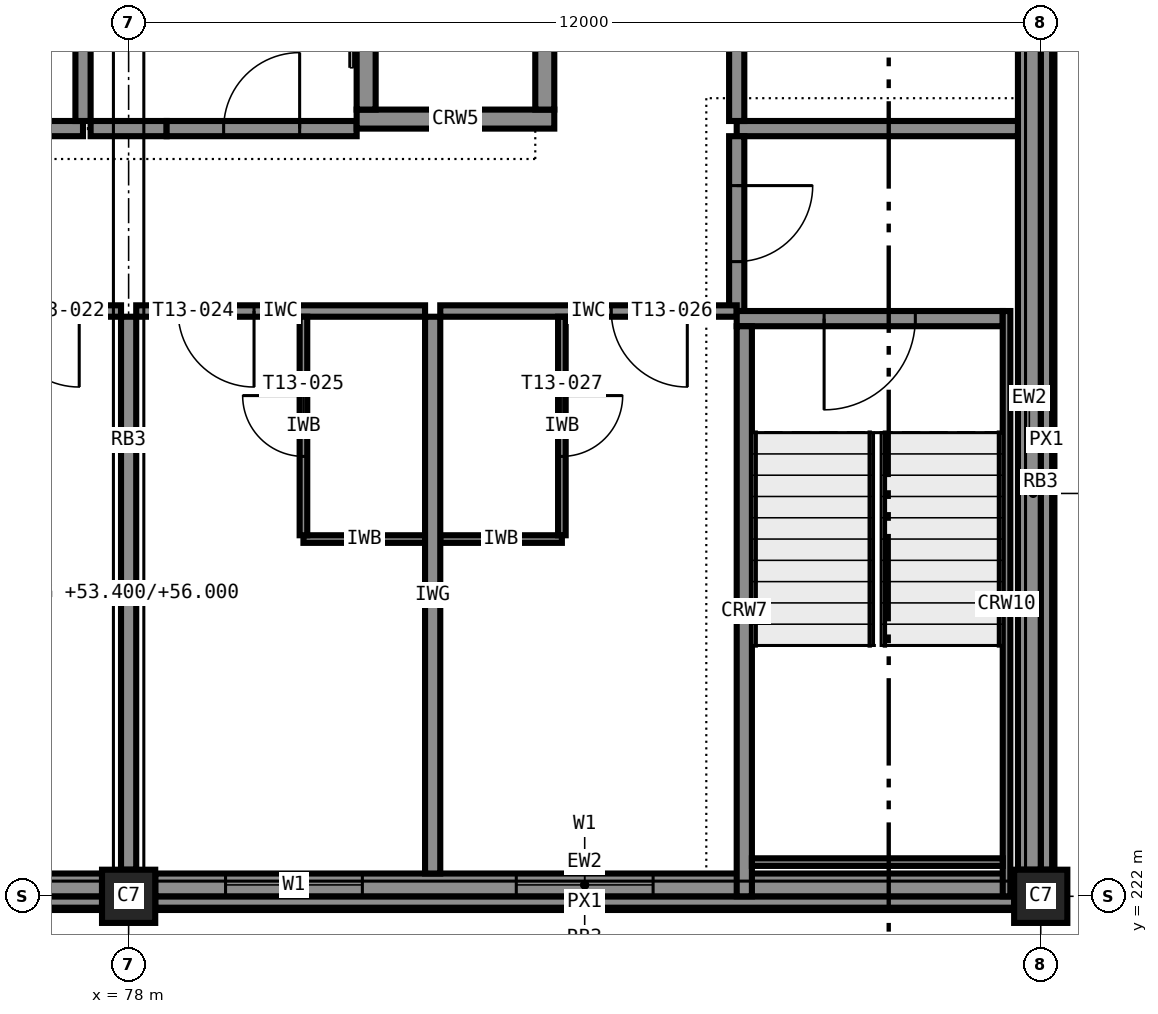
"""IFC4 building model, lengths in metres.
Left out: names, types, materials, properties, quantities, classifications, styles, units other than length and angle.
Written with IfcOpenShell. Run it as: python <this file> out.ifc"""

import sys

from ifc_helpers import new_model, si_unit, direction, frame, frame_2d, origin, origin_2d, place, context, subcontext, project, spatial, rectangle, extrude, element, fill, save


model = new_model("IFC4")
c1 = context("Model", 3, precision=1e-05, world=origin(), true_north=direction((0.0, 1.0)))
c2 = subcontext(c1, "Body", "Model", "MODEL_VIEW")
j1 = project(units=[si_unit("LENGTHUNIT", "METRE"), si_unit("PLANEANGLEUNIT", "RADIAN")], contexts=[c1])
p1 = place(None, origin())
s1 = spatial("IfcSite", under=j1, at=p1, CompositionType="ELEMENT")
p2 = place(p1, origin())
s2 = spatial("IfcBuilding", under=s1, at=p2, CompositionType="ELEMENT")
p3 = place(p2, frame((0.0, 0.0, 53.4)))
s3 = spatial("IfcBuildingStorey", under=s2, at=p3, CompositionType="ELEMENT", Elevation=53.4)
for number, where, z_axis, x_axis in (
    (1, (78.0, 222.0, 0.0), (0.0, 0.0, 1.0), (1.0, 0.0, 0.0)),
    (2, (90.0, 222.0, 0.0), (0.0, 0.0, 1.0), (1.0, 0.0, 0.0)),
):
    element("IfcColumn", number, at=place(p3, frame(where, z_axis=z_axis, x_axis=x_axis)), inside=s3, PredefinedType="COLUMN", context=c2, shape_type="SweptSolid", body=[
        extrude(rectangle(XDim=0.7, YDim=0.7, at=origin_2d()), origin(), (0.0, 0.0, 1.0), 3.6),
    ])
p4 = place(p3, frame((81.0, 232.225, 0.0), z_axis=(0.0, 0.0, 1.0), x_axis=(1.0, 0.0, 0.0)))
e3 = element("IfcWall", 3, at=p4, inside=s3, PredefinedType="SHEAR", context=c2, shape_type="SweptSolid", body=[
    extrude(rectangle(XDim=2.6, YDim=0.25, at=frame_2d((1.3, 0.0))), origin(), (0.0, 0.0, 1.0), 3.6),
])
p5 = place(p3, frame((81.125, 232.35, 0.0), z_axis=(0.0, 0.0, 1.0), x_axis=(0.0, 1.0, 0.0)))
e4 = element("IfcWall", 4, at=p5, inside=s3, PredefinedType="SHEAR", context=c2, shape_type="SweptSolid", body=[
    extrude(rectangle(XDim=3.3, YDim=0.25, at=frame_2d((1.65, 0.0))), origin(), (0.0, 0.0, 1.0), 3.6),
])
p6 = place(p5, frame((1.1, 0.0, 0.0)))
e5 = element("IfcOpeningElement", 5, at=p6, cuts=e4, PredefinedType="OPENING", context=c2, shape_type="SweptSolid", body=[
    extrude(rectangle(XDim=1.1, YDim=2.1, at=frame_2d((0.55, 1.05))), frame((0.0, 0.135, 0.0), z_axis=(0.0, -1.0, 0.0), x_axis=(1.0, 0.0, 0.0)), (0.0, 0.0, 1.0), 0.27),
])
p7 = place(p3, frame((83.475, 232.35, 0.0), z_axis=(0.0, 0.0, 1.0), x_axis=(0.0, 1.0, 0.0)))
e6 = element("IfcWall", 6, at=p7, inside=s3, PredefinedType="SHEAR", context=c2, shape_type="SweptSolid", body=[
    extrude(rectangle(XDim=3.3, YDim=0.25, at=frame_2d((1.65, 0.0))), origin(), (0.0, 0.0, 1.0), 3.6),
])
p8 = place(p3, frame((89.5, 229.6, 0.0), z_axis=(0.0, 0.0, 1.0), x_axis=(-1.0, 0.0, 0.0)))
e7 = element("IfcWall", 7, at=p8, inside=s3, PredefinedType="SHEAR", context=c2, shape_type="SweptSolid", body=[
    extrude(rectangle(XDim=3.5, YDim=0.2, at=frame_2d((1.75, 0.0))), origin(), (0.0, 0.0, 1.0), 3.6),
])
p9 = place(p8, frame((1.15, 0.0, 0.0)))
e8 = element("IfcOpeningElement", 8, at=p9, cuts=e7, PredefinedType="OPENING", context=c2, shape_type="SweptSolid", body=[
    extrude(rectangle(XDim=1.2, YDim=2.1, at=frame_2d((0.6, 1.05))), frame((0.0, 0.11, 0.0), z_axis=(0.0, -1.0, 0.0), x_axis=(1.0, 0.0, 0.0)), (0.0, 0.0, 1.0), 0.22),
])
p10 = place(p3, frame((86.1, 222.0, 0.0), z_axis=(0.0, 0.0, 1.0), x_axis=(0.0, 1.0, 0.0)))
e9 = element("IfcWall", 9, at=p10, inside=s3, PredefinedType="SHEAR", context=c2, shape_type="SweptSolid", body=[
    extrude(rectangle(XDim=7.5, YDim=0.2, at=frame_2d((3.75, 0.0))), origin(), (0.0, 0.0, 1.0), 3.6),
])
p11 = place(p3, frame((89.55, 229.7, 0.0), z_axis=(0.0, 0.0, 1.0), x_axis=(0.0, -1.0, 0.0)))
e10 = element("IfcWall", 10, at=p11, inside=s3, PredefinedType="SHEAR", context=c2, shape_type="SweptSolid", body=[
    extrude(rectangle(XDim=7.7, YDim=0.1, at=frame_2d((3.85, 0.0))), origin(), (0.0, 0.0, 1.0), 3.4),
])
p12 = place(p3, frame((89.5, 222.45, 0.0), z_axis=(0.0, 0.0, 1.0), x_axis=(-1.0, 0.0, 0.0)))
e11 = element("IfcWall", 11, at=p12, inside=s3, PredefinedType="SHEAR", context=c2, shape_type="SweptSolid", body=[
    extrude(rectangle(XDim=3.3, YDim=0.1, at=frame_2d((1.65, 0.0))), origin(), (0.0, 0.0, 1.0), 3.4),
])
p13 = place(p3, frame((66.35, 222.15, 0.0), z_axis=(0.0, 0.0, 1.0), x_axis=(1.0, 0.0, 0.0)))
e12 = element("IfcWall", 12, at=p13, inside=s3, PredefinedType="STANDARD", context=c2, shape_type="SweptSolid", body=[
    extrude(rectangle(XDim=11.3, YDim=0.3, at=frame_2d((5.65, 0.0))), origin(), (0.0, 0.0, 1.0), 2.6),
])
p14 = place(p13, frame((1.125, 0.0, 0.85)))
e13 = element("IfcOpeningElement", 13, at=p14, cuts=e12, PredefinedType="OPENING", context=c2, shape_type="SweptSolid", body=[
    extrude(rectangle(XDim=1.8, YDim=1.75, at=frame_2d((0.9, 0.875))), frame((0.0, 0.16, 0.0), z_axis=(0.0, -1.0, 0.0), x_axis=(1.0, 0.0, 0.0)), (0.0, 0.0, 1.0), 0.32),
])
p15 = place(p13, frame((4.95, 0.0, 0.85)))
e14 = element("IfcOpeningElement", 14, at=p15, cuts=e12, PredefinedType="OPENING", context=c2, shape_type="SweptSolid", body=[
    extrude(rectangle(XDim=1.8, YDim=1.75, at=frame_2d((0.9, 0.875))), frame((0.0, 0.16, 0.0), z_axis=(0.0, -1.0, 0.0), x_axis=(1.0, 0.0, 0.0)), (0.0, 0.0, 1.0), 0.32),
])
p16 = place(p13, frame((8.575, 0.0, 0.85)))
e15 = element("IfcOpeningElement", 15, at=p16, cuts=e12, PredefinedType="OPENING", context=c2, shape_type="SweptSolid", body=[
    extrude(rectangle(XDim=1.8, YDim=1.75, at=frame_2d((0.9, 0.875))), frame((0.0, 0.16, 0.0), z_axis=(0.0, -1.0, 0.0), x_axis=(1.0, 0.0, 0.0)), (0.0, 0.0, 1.0), 0.32),
])
p17 = place(p3, frame((78.35, 222.15, 0.0), z_axis=(0.0, 0.0, 1.0), x_axis=(1.0, 0.0, 0.0)))
e16 = element("IfcWall", 16, at=p17, inside=s3, PredefinedType="STANDARD", context=c2, shape_type="SweptSolid", body=[
    extrude(rectangle(XDim=11.3, YDim=0.3, at=frame_2d((5.65, 0.0))), origin(), (0.0, 0.0, 1.0), 2.6),
])
p18 = place(p17, frame((0.925, 0.0, 0.85)))
e17 = element("IfcOpeningElement", 17, at=p18, cuts=e16, PredefinedType="OPENING", context=c2, shape_type="SweptSolid", body=[
    extrude(rectangle(XDim=1.8, YDim=1.75, at=frame_2d((0.9, 0.875))), frame((0.0, 0.16, 0.0), z_axis=(0.0, -1.0, 0.0), x_axis=(1.0, 0.0, 0.0)), (0.0, 0.0, 1.0), 0.32),
])
p19 = place(p17, frame((4.75, 0.0, 0.85)))
e18 = element("IfcOpeningElement", 18, at=p19, cuts=e16, PredefinedType="OPENING", context=c2, shape_type="SweptSolid", body=[
    extrude(rectangle(XDim=1.8, YDim=1.75, at=frame_2d((0.9, 0.875))), frame((0.0, 0.16, 0.0), z_axis=(0.0, -1.0, 0.0), x_axis=(1.0, 0.0, 0.0)), (0.0, 0.0, 1.0), 0.32),
])
for number, where, z_axis, x_axis in (
    (19, (66.35, 221.925, 3.4), (0.0, 0.0, 1.0), (1.0, 0.0, 0.0)),
    (20, (78.35, 221.925, 3.4), (0.0, 0.0, 1.0), (1.0, 0.0, 0.0)),
):
    element("IfcWall", number, at=place(p3, frame(where, z_axis=z_axis, x_axis=x_axis)), inside=s3, PredefinedType="STANDARD", context=c2, shape_type="SweptSolid", body=[
        extrude(rectangle(XDim=11.3, YDim=0.15, at=frame_2d((5.65, 0.0))), origin(), (0.0, 0.0, 1.0), 0.2),
    ])
p20 = place(p3, frame((89.85, 222.35, 0.0), z_axis=(0.0, 0.0, 1.0), x_axis=(0.0, 1.0, 0.0)))
e21 = element("IfcWall", 21, at=p20, inside=s3, PredefinedType="STANDARD", context=c2, shape_type="SweptSolid", body=[
    extrude(rectangle(XDim=11.3, YDim=0.3, at=frame_2d((5.65, 0.0))), origin(), (0.0, 0.0, 1.0), 2.6),
])
p21 = place(p3, frame((90.075, 222.35, 3.4), z_axis=(0.0, 0.0, 1.0), x_axis=(0.0, 1.0, 0.0)))
e22 = element("IfcWall", 22, at=p21, inside=s3, PredefinedType="STANDARD", context=c2, shape_type="SweptSolid", body=[
    extrude(rectangle(XDim=11.3, YDim=0.15, at=frame_2d((5.65, 0.0))), origin(), (0.0, 0.0, 1.0), 0.2),
])
p22 = place(p3, frame((75.5, 232.1, 0.0), z_axis=(0.0, 0.0, 1.0), x_axis=(1.0, 0.0, 0.0)))
e23 = element("IfcWall", 23, at=p22, inside=s3, PredefinedType="PARTITIONING", context=c2, shape_type="SweptSolid", body=[
    extrude(rectangle(XDim=1.9, YDim=0.2, at=frame_2d((0.95, 0.0))), origin(), (0.0, 0.0, 1.0), 3.4),
])
p23 = place(p3, frame((77.5, 232.1, 0.0), z_axis=(0.0, 0.0, 1.0), x_axis=(1.0, 0.0, 0.0)))
e24 = element("IfcWall", 24, at=p23, inside=s3, PredefinedType="PARTITIONING", context=c2, shape_type="SweptSolid", body=[
    extrude(rectangle(XDim=1.0, YDim=0.2, at=frame_2d((0.5, 0.0))), origin(), (0.0, 0.0, 1.0), 3.4),
])
p24 = place(p3, frame((78.5, 232.1, 0.0), z_axis=(0.0, 0.0, 1.0), x_axis=(1.0, 0.0, 0.0)))
e25 = element("IfcWall", 25, at=p24, inside=s3, PredefinedType="PARTITIONING", context=c2, shape_type="SweptSolid", body=[
    extrude(rectangle(XDim=2.5, YDim=0.2, at=frame_2d((1.25, 0.0))), origin(), (0.0, 0.0, 1.0), 3.4),
])
p25 = place(p24, frame((0.75, 0.0, 0.0)))
e26 = element("IfcOpeningElement", 26, at=p25, cuts=e25, PredefinedType="OPENING", context=c2, shape_type="SweptSolid", body=[
    extrude(rectangle(XDim=1.0, YDim=2.1, at=frame_2d((0.5, 1.05))), frame((0.0, 0.11, 0.0), z_axis=(0.0, -1.0, 0.0), x_axis=(1.0, 0.0, 0.0)), (0.0, 0.0, 1.0), 0.22),
])
p26 = place(p3, frame((86.0, 232.1, 0.0), z_axis=(0.0, 0.0, 1.0), x_axis=(1.0, 0.0, 0.0)))
e27 = element("IfcWall", 27, at=p26, inside=s3, PredefinedType="PARTITIONING", context=c2, shape_type="SweptSolid", body=[
    extrude(rectangle(XDim=3.7, YDim=0.2, at=frame_2d((1.85, 0.0))), origin(), (0.0, 0.0, 1.0), 3.4),
])
p27 = place(p3, frame((77.4, 232.2, 0.0), z_axis=(0.0, 0.0, 1.0), x_axis=(0.0, 1.0, 0.0)))
e28 = element("IfcWall", 28, at=p27, inside=s3, PredefinedType="PARTITIONING", context=c2, shape_type="SweptSolid", body=[
    extrude(rectangle(XDim=3.6, YDim=0.2, at=frame_2d((1.8, 0.0))), origin(), (0.0, 0.0, 1.0), 3.4),
])
p28 = place(p3, frame((86.0, 235.8, 0.0), z_axis=(0.0, 0.0, 1.0), x_axis=(0.0, -1.0, 0.0)))
e29 = element("IfcWall", 29, at=p28, inside=s3, PredefinedType="PARTITIONING", context=c2, shape_type="SweptSolid", body=[
    extrude(rectangle(XDim=3.6, YDim=0.2, at=frame_2d((1.8, 0.0))), origin(), (0.0, 0.0, 1.0), 3.4),
])
p29 = place(p28, frame((1.35, 0.0, 0.0)))
e30 = element("IfcOpeningElement", 30, at=p29, cuts=e29, PredefinedType="OPENING", context=c2, shape_type="SweptSolid", body=[
    extrude(rectangle(XDim=0.9, YDim=2.1, at=frame_2d((0.45, 1.05))), frame((0.0, 0.11, 0.0), z_axis=(0.0, -1.0, 0.0), x_axis=(1.0, 0.0, 0.0)), (0.0, 0.0, 1.0), 0.22),
])
p30 = place(p3, frame((86.0, 232.0, 0.0), z_axis=(0.0, 0.0, 1.0), x_axis=(0.0, -1.0, 0.0)))
e31 = element("IfcWall", 31, at=p30, inside=s3, PredefinedType="PARTITIONING", context=c2, shape_type="SweptSolid", body=[
    extrude(rectangle(XDim=2.3, YDim=0.2, at=frame_2d((1.15, 0.0))), origin(), (0.0, 0.0, 1.0), 3.4),
])
p31 = place(p30, frame((0.65, 0.0, 0.0)))
e32 = element("IfcOpeningElement", 32, at=p31, cuts=e31, PredefinedType="OPENING", context=c2, shape_type="SweptSolid", body=[
    extrude(rectangle(XDim=1.0, YDim=2.1, at=frame_2d((0.5, 1.05))), frame((0.0, 0.11, 0.0), z_axis=(0.0, -1.0, 0.0), x_axis=(1.0, 0.0, 0.0)), (0.0, 0.0, 1.0), 0.22),
])
p32 = place(p3, frame((77.9, 229.7, 0.0), z_axis=(0.0, 0.0, 1.0), x_axis=(-1.0, 0.0, 0.0)))
e33 = element("IfcWall", 33, at=p32, inside=s3, PredefinedType="PARTITIONING", context=c2, shape_type="SweptSolid", body=[
    extrude(rectangle(XDim=3.8, YDim=0.15, at=frame_2d((1.9, 0.0))), origin(), (0.0, 0.0, 1.0), 3.4),
])
p33 = place(p32, frame((0.55, 0.0, 0.0)))
e34 = element("IfcOpeningElement", 34, at=p33, cuts=e33, PredefinedType="OPENING", context=c2, shape_type="SweptSolid", body=[
    extrude(rectangle(XDim=1.0, YDim=2.1, at=frame_2d((0.5, 1.05))), frame((0.0, 0.085, 0.0), z_axis=(0.0, -1.0, 0.0), x_axis=(1.0, 0.0, 0.0)), (0.0, 0.0, 1.0), 0.17),
])
p34 = place(p3, frame((81.9, 229.7, 0.0), z_axis=(0.0, 0.0, 1.0), x_axis=(-1.0, 0.0, 0.0)))
e35 = element("IfcWall", 35, at=p34, inside=s3, PredefinedType="PARTITIONING", context=c2, shape_type="SweptSolid", body=[
    extrude(rectangle(XDim=3.8, YDim=0.15, at=frame_2d((1.9, 0.0))), origin(), (0.0, 0.0, 1.0), 3.4),
])
p35 = place(p34, frame((2.25, 0.0, 0.0)))
e36 = element("IfcOpeningElement", 36, at=p35, cuts=e35, PredefinedType="OPENING", context=c2, shape_type="SweptSolid", body=[
    extrude(rectangle(XDim=1.0, YDim=2.1, at=frame_2d((0.5, 1.05))), frame((0.0, 0.085, 0.0), z_axis=(0.0, -1.0, 0.0), x_axis=(1.0, 0.0, 0.0)), (0.0, 0.0, 1.0), 0.17),
])
p36 = place(p3, frame((80.3, 226.7, 0.0), z_axis=(0.0, 0.0, 1.0), x_axis=(1.0, 0.0, 0.0)))
e37 = element("IfcWall", 37, at=p36, inside=s3, PredefinedType="PARTITIONING", context=c2, shape_type="SweptSolid", body=[
    extrude(rectangle(XDim=1.6, YDim=0.1, at=frame_2d((0.8, 0.0))), origin(), (0.0, 0.0, 1.0), 3.4),
])
p37 = place(p3, frame((80.3, 226.75, 0.0), z_axis=(0.0, 0.0, 1.0), x_axis=(0.0, 1.0, 0.0)))
e38 = element("IfcWall", 38, at=p37, inside=s3, PredefinedType="PARTITIONING", context=c2, shape_type="SweptSolid", body=[
    extrude(rectangle(XDim=2.875, YDim=0.1, at=frame_2d((1.438, 0.0))), origin(), (0.0, 0.0, 1.0), 3.4),
])
p38 = place(p37, frame((1.038, 0.0, 0.0)))
e39 = element("IfcOpeningElement", 39, at=p38, cuts=e38, PredefinedType="OPENING", context=c2, shape_type="SweptSolid", body=[
    extrude(rectangle(XDim=0.8, YDim=2.1, at=frame_2d((0.4, 1.05))), frame((0.0, 0.06, 0.0), z_axis=(0.0, -1.0, 0.0), x_axis=(1.0, 0.0, 0.0)), (0.0, 0.0, 1.0), 0.12),
])
p39 = place(p3, frame((86.0, 229.7, 0.0), z_axis=(0.0, 0.0, 1.0), x_axis=(-1.0, 0.0, 0.0)))
e40 = element("IfcWall", 40, at=p39, inside=s3, PredefinedType="PARTITIONING", context=c2, shape_type="SweptSolid", body=[
    extrude(rectangle(XDim=3.9, YDim=0.15, at=frame_2d((1.95, 0.0))), origin(), (0.0, 0.0, 1.0), 3.4),
])
p40 = place(p39, frame((0.65, 0.0, 0.0)))
e41 = element("IfcOpeningElement", 41, at=p40, cuts=e40, PredefinedType="OPENING", context=c2, shape_type="SweptSolid", body=[
    extrude(rectangle(XDim=1.0, YDim=2.1, at=frame_2d((0.5, 1.05))), frame((0.0, 0.085, 0.0), z_axis=(0.0, -1.0, 0.0), x_axis=(1.0, 0.0, 0.0)), (0.0, 0.0, 1.0), 0.17),
])
p41 = place(p3, frame((82.1, 226.7, 0.0), z_axis=(0.0, 0.0, 1.0), x_axis=(1.0, 0.0, 0.0)))
e42 = element("IfcWall", 42, at=p41, inside=s3, PredefinedType="PARTITIONING", context=c2, shape_type="SweptSolid", body=[
    extrude(rectangle(XDim=1.6, YDim=0.1, at=frame_2d((0.8, 0.0))), origin(), (0.0, 0.0, 1.0), 3.4),
])
p42 = place(p3, frame((83.7, 229.625, 0.0), z_axis=(0.0, 0.0, 1.0), x_axis=(0.0, -1.0, 0.0)))
e43 = element("IfcWall", 43, at=p42, inside=s3, PredefinedType="PARTITIONING", context=c2, shape_type="SweptSolid", body=[
    extrude(rectangle(XDim=2.875, YDim=0.1, at=frame_2d((1.438, 0.0))), origin(), (0.0, 0.0, 1.0), 3.4),
])
p43 = place(p42, frame((1.038, 0.0, 0.0)))
e44 = element("IfcOpeningElement", 44, at=p43, cuts=e43, PredefinedType="OPENING", context=c2, shape_type="SweptSolid", body=[
    extrude(rectangle(XDim=0.8, YDim=2.1, at=frame_2d((0.4, 1.05))), frame((0.0, 0.06, 0.0), z_axis=(0.0, -1.0, 0.0), x_axis=(1.0, 0.0, 0.0)), (0.0, 0.0, 1.0), 0.12),
])
p44 = place(p3, frame((78.0, 222.35, 0.0), z_axis=(0.0, 0.0, 1.0), x_axis=(0.0, 1.0, 0.0)))
e45 = element("IfcWall", 45, at=p44, inside=s3, PredefinedType="PARTITIONING", context=c2, shape_type="SweptSolid", body=[
    extrude(rectangle(XDim=7.275, YDim=0.2, at=frame_2d((3.637, 0.0))), origin(), (0.0, 0.0, 1.0), 2.6),
])
p45 = place(p3, frame((82.0, 222.3, 0.0), z_axis=(0.0, 0.0, 1.0), x_axis=(0.0, 1.0, 0.0)))
e46 = element("IfcWall", 46, at=p45, inside=s3, PredefinedType="PARTITIONING", context=c2, shape_type="SweptSolid", body=[
    extrude(rectangle(XDim=7.325, YDim=0.2, at=frame_2d((3.663, 0.0))), origin(), (0.0, 0.0, 1.0), 3.4),
])
p46 = place(p18, origin())
e47 = element("IfcWindow", 47, at=p46, inside=s3, PartitioningType="SINGLE_PANEL", PredefinedType="WINDOW", context=c2, shape_type="SweptSolid", body=[
    extrude(rectangle(XDim=1.8, YDim=1.75, at=frame_2d((0.9, 0.875))), frame((0.0, 0.03, 0.0), z_axis=(0.0, -1.0, 0.0), x_axis=(1.0, 0.0, 0.0)), (0.0, 0.0, 1.0), 0.06),
])
fill(e17, e47)
p47 = place(p19, origin())
e48 = element("IfcWindow", 48, at=p47, inside=s3, PartitioningType="SINGLE_PANEL", PredefinedType="WINDOW", context=c2, shape_type="SweptSolid", body=[
    extrude(rectangle(XDim=1.8, YDim=1.75, at=frame_2d((0.9, 0.875))), frame((0.0, 0.03, 0.0), z_axis=(0.0, -1.0, 0.0), x_axis=(1.0, 0.0, 0.0)), (0.0, 0.0, 1.0), 0.06),
])
fill(e18, e48)
p48 = place(p25, origin())
e49 = element("IfcDoor", 49, at=p48, inside=s3, OperationType="SINGLE_SWING_RIGHT", PredefinedType="DOOR", context=c2, shape_type="SweptSolid", body=[
    extrude(rectangle(XDim=1.0, YDim=2.1, at=frame_2d((0.5, 1.05))), frame((0.0, 0.025, 0.0), z_axis=(0.0, -1.0, 0.0), x_axis=(1.0, 0.0, 0.0)), (0.0, 0.0, 1.0), 0.05),
])
fill(e26, e49)
p49 = place(p31, origin())
e50 = element("IfcDoor", 50, at=p49, inside=s3, OperationType="SINGLE_SWING_LEFT", PredefinedType="DOOR", context=c2, shape_type="SweptSolid", body=[
    extrude(rectangle(XDim=1.0, YDim=2.1, at=frame_2d((0.5, 1.05))), frame((0.0, 0.025, 0.0), z_axis=(0.0, -1.0, 0.0), x_axis=(1.0, 0.0, 0.0)), (0.0, 0.0, 1.0), 0.05),
])
fill(e32, e50)
p50 = place(p33, origin())
e51 = element("IfcDoor", 51, at=p50, inside=s3, OperationType="SINGLE_SWING_LEFT", PredefinedType="DOOR", context=c2, shape_type="SweptSolid", body=[
    extrude(rectangle(XDim=1.0, YDim=2.1, at=frame_2d((0.5, 1.05))), frame((0.0, 0.025, 0.0), z_axis=(0.0, -1.0, 0.0), x_axis=(1.0, 0.0, 0.0)), (0.0, 0.0, 1.0), 0.05),
])
fill(e34, e51)
p51 = place(p35, origin())
e52 = element("IfcDoor", 52, at=p51, inside=s3, OperationType="SINGLE_SWING_LEFT", PredefinedType="DOOR", context=c2, shape_type="SweptSolid", body=[
    extrude(rectangle(XDim=1.0, YDim=2.1, at=frame_2d((0.5, 1.05))), frame((0.0, 0.025, 0.0), z_axis=(0.0, -1.0, 0.0), x_axis=(1.0, 0.0, 0.0)), (0.0, 0.0, 1.0), 0.05),
])
fill(e36, e52)
p52 = place(p38, origin())
e53 = element("IfcDoor", 53, at=p52, inside=s3, OperationType="SINGLE_SWING_RIGHT", PredefinedType="DOOR", context=c2, shape_type="SweptSolid", body=[
    extrude(rectangle(XDim=0.8, YDim=2.1, at=frame_2d((0.4, 1.05))), frame((0.0, 0.025, 0.0), z_axis=(0.0, -1.0, 0.0), x_axis=(1.0, 0.0, 0.0)), (0.0, 0.0, 1.0), 0.05),
])
fill(e39, e53)
p53 = place(p40, origin())
e54 = element("IfcDoor", 54, at=p53, inside=s3, OperationType="SINGLE_SWING_LEFT", PredefinedType="DOOR", context=c2, shape_type="SweptSolid", body=[
    extrude(rectangle(XDim=1.0, YDim=2.1, at=frame_2d((0.5, 1.05))), frame((0.0, 0.025, 0.0), z_axis=(0.0, -1.0, 0.0), x_axis=(1.0, 0.0, 0.0)), (0.0, 0.0, 1.0), 0.05),
])
fill(e41, e54)
p54 = place(p43, origin())
e55 = element("IfcDoor", 55, at=p54, inside=s3, OperationType="SINGLE_SWING_LEFT", PredefinedType="DOOR", context=c2, shape_type="SweptSolid", body=[
    extrude(rectangle(XDim=0.8, YDim=2.1, at=frame_2d((0.4, 1.05))), frame((0.0, 0.025, 0.0), z_axis=(0.0, -1.0, 0.0), x_axis=(1.0, 0.0, 0.0)), (0.0, 0.0, 1.0), 0.05),
])
fill(e44, e55)
p55 = place(p9, origin())
e56 = element("IfcDoor", 56, at=p55, inside=s3, OperationType="SINGLE_SWING_RIGHT", PredefinedType="DOOR", context=c2, shape_type="SweptSolid", body=[
    extrude(rectangle(XDim=1.2, YDim=2.1, at=frame_2d((0.6, 1.05))), frame((0.0, 0.025, 0.0), z_axis=(0.0, -1.0, 0.0), x_axis=(1.0, 0.0, 0.0)), (0.0, 0.0, 1.0), 0.05),
])
fill(e8, e56)
save(model, sys.argv[1])
